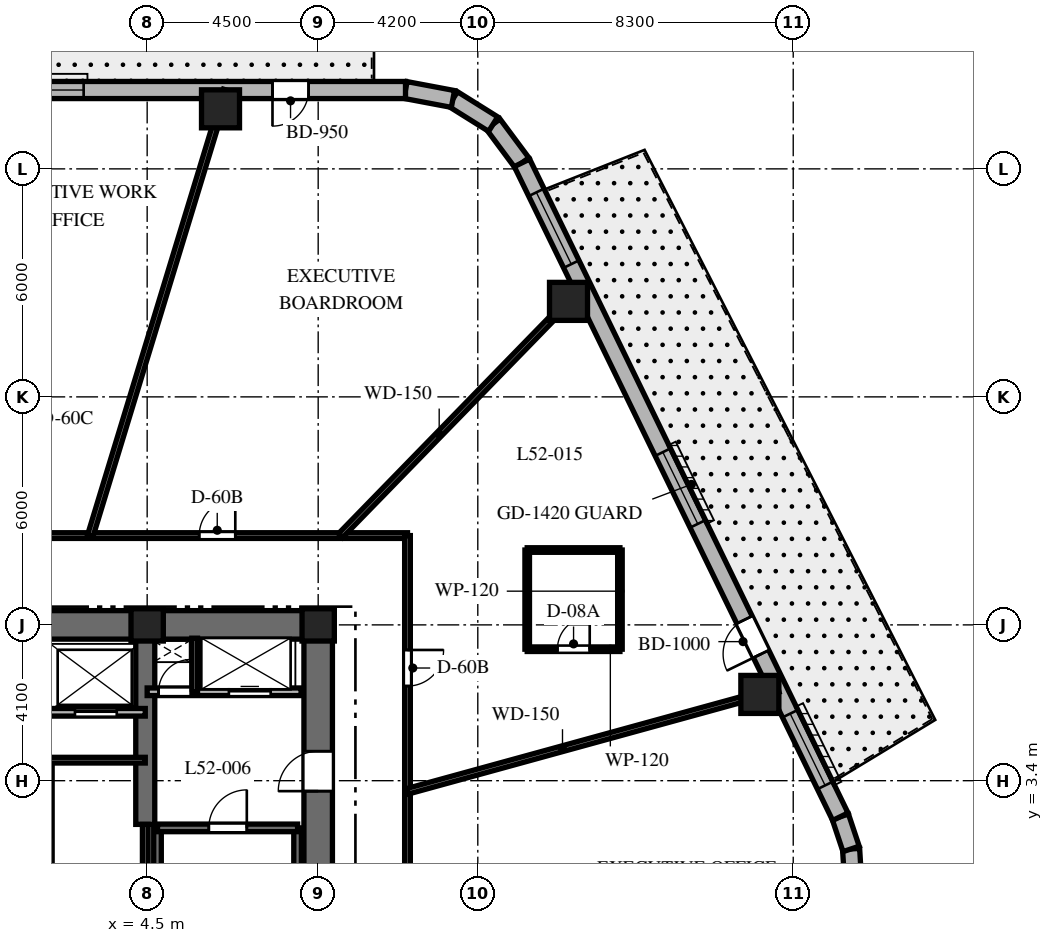
"""IFC4 building model, lengths in metres.
Left out: names, types, materials, properties, quantities, classifications, styles, units other than length and angle.
Written with IfcOpenShell. Run it as: python <this file> out.ifc"""

import sys

from ifc_helpers import new_model, si_unit, direction, frame, frame_2d, origin, origin_2d, place, context, subcontext, project, spatial, rectangle, extrude, element, fill, save


model = new_model("IFC4")
c1 = context("Model", 3, precision=1e-05, world=origin(), true_north=direction((0.0, 1.0)))
c2 = subcontext(c1, "Body", "Model", "MODEL_VIEW")
j1 = project(units=[si_unit("LENGTHUNIT", "METRE"), si_unit("PLANEANGLEUNIT", "RADIAN")], contexts=[c1])
p1 = place(None, origin())
s1 = spatial("IfcSite", under=j1, at=p1, CompositionType="ELEMENT")
p2 = place(p1, origin())
s2 = spatial("IfcBuilding", under=s1, at=p2, CompositionType="ELEMENT")
p3 = place(p2, frame((0.0, 0.0, 210.3)))
s3 = spatial("IfcBuildingStorey", under=s2, at=p3, CompositionType="ELEMENT", Elevation=210.3)
p4 = place(p3, frame((1.85, 7.5, 0.0), z_axis=(0.0, 0.0, 1.0), x_axis=(1.0, 0.0, 0.0)))
e1 = element("IfcWall", 1, at=p4, inside=s3, PredefinedType="SHEAR", context=c2, shape_type="SweptSolid", body=[
    extrude(rectangle(XDim=7.525, YDim=0.75, at=frame_2d((3.762, 0.0))), origin(), (0.0, 0.0, 1.0), 3.8),
])
p5 = place(p3, frame((9.0, -7.125, 0.0), z_axis=(0.0, 0.0, 1.0), x_axis=(0.0, 1.0, 0.0)))
e2 = element("IfcWall", 2, at=p5, inside=s3, PredefinedType="SHEAR", context=c2, shape_type="SweptSolid", body=[
    extrude(rectangle(XDim=14.25, YDim=0.75, at=frame_2d((7.125, 0.0))), origin(), (0.0, 0.0, 1.0), 3.8),
])
p6 = place(p5, frame((10.25, 0.0, 0.0)))
e3 = element("IfcOpeningElement", 3, at=p6, cuts=e2, PredefinedType="OPENING", context=c2, shape_type="SweptSolid", body=[
    extrude(rectangle(XDim=1.05, YDim=2.15, at=frame_2d((0.525, 1.075))), frame((0.0, 0.385, 0.0), z_axis=(0.0, -1.0, 0.0), x_axis=(1.0, 0.0, 0.0)), (0.0, 0.0, 1.0), 0.77),
])
p7 = place(p3, frame((4.45, 2.25, 0.0), z_axis=(0.0, 0.0, 1.0), x_axis=(0.0, 1.0, 0.0)))
e4 = element("IfcWall", 4, at=p7, inside=s3, PredefinedType="SHEAR", context=c2, shape_type="SweptSolid", body=[
    extrude(rectangle(XDim=4.875, YDim=0.5, at=frame_2d((2.438, 0.0))), origin(), (0.0, 0.0, 1.0), 3.8),
])
for number, where, z_axis, x_axis in (
    (5, (4.772, -6.985, 0.0), (0.0, 0.0, 1.0), (0.0, 1.0, 0.0)),
    (6, (8.458, -6.985, 0.0), (0.0, 0.0, 1.0), (0.0, 1.0, 0.0)),
):
    element("IfcWall", number, at=place(p3, frame(where, z_axis=z_axis, x_axis=x_axis)), inside=s3, PredefinedType="SHEAR", context=c2, shape_type="SweptSolid", body=[
        extrude(rectangle(XDim=9.143, YDim=0.2, at=frame_2d((4.572, 0.0))), origin(), (0.0, 0.0, 1.0), 3.8),
    ])
p8 = place(p3, frame((4.772, 2.158, 0.0), z_axis=(0.0, 0.0, 1.0), x_axis=(1.0, 0.0, 0.0)))
e7 = element("IfcWall", 7, at=p8, inside=s3, PredefinedType="SHEAR", context=c2, shape_type="SweptSolid", body=[
    extrude(rectangle(XDim=3.686, YDim=0.2, at=frame_2d((1.843, 0.0))), origin(), (0.0, 0.0, 1.0), 3.8),
])
p9 = place(p8, frame((1.35, 0.0, 0.0)))
e8 = element("IfcOpeningElement", 8, at=p9, cuts=e7, PredefinedType="OPENING", context=c2, shape_type="SweptSolid", body=[
    extrude(rectangle(XDim=1.0, YDim=2.15, at=frame_2d((0.5, 1.075))), frame((0.0, 0.11, 0.0), z_axis=(0.0, -1.0, 0.0), x_axis=(1.0, 0.0, 0.0)), (0.0, 0.0, 1.0), 0.22),
])
for number, where, z_axis, x_axis in (
    (9, (9.0, 7.5, 0.0), (0.0, 0.0, 1.0), (1.0, 0.0, 0.0)),
    (10, (4.5, 7.5, 0.0), (0.0, 0.0, 1.0), (1.0, 0.0, 0.0)),
):
    element("IfcColumn", number, at=place(p3, frame(where, z_axis=z_axis, x_axis=x_axis)), inside=s3, PredefinedType="COLUMN", context=c2, shape_type="SweptSolid", body=[
        extrude(rectangle(XDim=0.85, YDim=0.85, at=origin_2d()), origin(), (0.0, 0.0, 1.0), 3.8),
    ])
for number, where, z_axis, x_axis in (
    (11, (20.622, 5.67, 0.0), (0.0, 0.0, 1.0), (1.0, 0.0, 0.0)),
    (12, (15.587, 16.013, 0.0), (0.0, 0.0, 1.0), (1.0, 0.0, 0.0)),
    (13, (6.43, 21.08, 0.0), (0.0, 0.0, 1.0), (1.0, 0.0, 0.0)),
):
    element("IfcColumn", number, at=place(p3, frame(where, z_axis=z_axis, x_axis=x_axis)), inside=s3, PredefinedType="COLUMN", context=c2, shape_type="SweptSolid", body=[
        extrude(rectangle(XDim=1.0, YDim=1.0, at=origin_2d()), origin(), (0.0, 0.0, 1.0), 3.8),
    ])
p10 = place(p3, frame((23.076, 0.727, 0.0), z_axis=(0.0, 0.0, 1.0), x_axis=(-0.060805222108, 0.998149650586, 0.0)))
e14 = element("IfcWall", 14, at=p10, inside=s3, PredefinedType="SOLIDWALL", context=c2, shape_type="SweptSolid", body=[
    extrude(rectangle(XDim=0.879, YDim=0.45, at=frame_2d((0.44, 0.0))), origin(), (0.0, 0.0, 1.0), 3.5),
])
p11 = place(p3, frame((23.023, 1.604, 0.0), z_axis=(0.0, 0.0, 1.0), x_axis=(-0.316801227695, 0.948491951537, 0.0)))
e15 = element("IfcWall", 15, at=p11, inside=s3, PredefinedType="SOLIDWALL", context=c2, shape_type="SweptSolid", body=[
    extrude(rectangle(XDim=0.894, YDim=0.45, at=frame_2d((0.447, 0.0))), origin(), (0.0, 0.0, 1.0), 3.5),
])
p12 = place(p3, frame((14.362, 19.658, 0.0), z_axis=(0.0, 0.0, 1.0), x_axis=(-0.596642462792, 0.80250717853, 0.0)))
e16 = element("IfcWall", 16, at=p12, inside=s3, PredefinedType="SOLIDWALL", context=c2, shape_type="SweptSolid", body=[
    extrude(rectangle(XDim=1.27, YDim=0.45, at=frame_2d((0.635, 0.0))), origin(), (0.0, 0.0, 1.0), 3.5),
])
p13 = place(p3, frame((13.604, 20.678, 0.0), z_axis=(0.0, 0.0, 1.0), x_axis=(-0.847910404124, 0.53013955387, 0.0)))
e17 = element("IfcWall", 17, at=p13, inside=s3, PredefinedType="SOLIDWALL", context=c2, shape_type="SweptSolid", body=[
    extrude(rectangle(XDim=1.249, YDim=0.45, at=frame_2d((0.624, 0.0))), origin(), (0.0, 0.0, 1.0), 3.5),
])
p14 = place(p3, frame((12.546, 21.34, 0.0), z_axis=(0.0, 0.0, 1.0), x_axis=(-0.982686750835, 0.18527479519, 0.0)))
e18 = element("IfcWall", 18, at=p14, inside=s3, PredefinedType="SOLIDWALL", context=c2, shape_type="SweptSolid", body=[
    extrude(rectangle(XDim=1.27, YDim=0.45, at=frame_2d((0.635, 0.0))), origin(), (0.0, 0.0, 1.0), 3.5),
])
p15 = place(p3, frame((22.74, 2.452, 0.0), z_axis=(0.0, 0.0, 1.0), x_axis=(-0.437753424814, 0.899095066755, 0.0)))
e19 = element("IfcWall", 19, at=p15, inside=s3, PredefinedType="SOLIDWALL", context=c2, shape_type="SweptSolid", body=[
    extrude(rectangle(XDim=19.137, YDim=0.45, at=frame_2d((9.569, 0.0))), origin(), (0.0, 0.0, 1.0), 3.5),
])
p16 = place(p15, frame((4.763, 0.0, 0.0)))
e20 = element("IfcOpeningElement", 20, at=p16, cuts=e19, PredefinedType="OPENING", context=c2, shape_type="SweptSolid", body=[
    extrude(rectangle(XDim=1.0, YDim=2.15, at=frame_2d((0.5, 1.075))), frame((0.0, 0.235, 0.0), z_axis=(0.0, -1.0, 0.0), x_axis=(1.0, 0.0, 0.0)), (0.0, 0.0, 1.0), 0.47),
])
p17 = place(p15, frame((8.57, 0.0, 0.8)))
e21 = element("IfcOpeningElement", 21, at=p17, cuts=e19, PredefinedType="OPENING", context=c2, shape_type="SweptSolid", body=[
    extrude(rectangle(XDim=2.1, YDim=1.85, at=frame_2d((1.05, 0.925))), frame((0.0, 0.235, 0.0), z_axis=(0.0, -1.0, 0.0), x_axis=(1.0, 0.0, 0.0)), (0.0, 0.0, 1.0), 0.47),
])
p18 = place(p15, frame((16.173, 0.0, 0.8)))
e22 = element("IfcOpeningElement", 22, at=p18, cuts=e19, PredefinedType="OPENING", context=c2, shape_type="SweptSolid", body=[
    extrude(rectangle(XDim=2.1, YDim=1.85, at=frame_2d((1.05, 0.925))), frame((0.0, 0.235, 0.0), z_axis=(0.0, -1.0, 0.0), x_axis=(1.0, 0.0, 0.0)), (0.0, 0.0, 1.0), 0.47),
])
p19 = place(p15, frame((0.916, 0.0, 0.8)))
e23 = element("IfcOpeningElement", 23, at=p19, cuts=e19, PredefinedType="OPENING", context=c2, shape_type="SweptSolid", body=[
    extrude(rectangle(XDim=2.1, YDim=1.85, at=frame_2d((1.05, 0.925))), frame((0.0, 0.235, 0.0), z_axis=(0.0, -1.0, 0.0), x_axis=(1.0, 0.0, 0.0)), (0.0, 0.0, 1.0), 0.47),
])
p20 = place(p3, frame((11.298, 21.575, 0.0), z_axis=(0.0, 0.0, 1.0), x_axis=(-1.0, 0.0, 0.0)))
e24 = element("IfcWall", 24, at=p20, inside=s3, PredefinedType="SOLIDWALL", context=c2, shape_type="SweptSolid", body=[
    extrude(rectangle(XDim=24.399, YDim=0.45, at=frame_2d((12.2, 0.0))), origin(), (0.0, 0.0, 1.0), 3.5),
])
p21 = place(p20, frame((2.55, 0.0, 0.0)))
e25 = element("IfcOpeningElement", 25, at=p21, cuts=e24, PredefinedType="OPENING", context=c2, shape_type="SweptSolid", body=[
    extrude(rectangle(XDim=0.95, YDim=2.15, at=frame_2d((0.475, 1.075))), frame((0.0, 0.235, 0.0), z_axis=(0.0, -1.0, 0.0), x_axis=(1.0, 0.0, 0.0)), (0.0, 0.0, 1.0), 0.47),
])
p22 = place(p20, frame((8.469, 0.0, 0.8)))
e26 = element("IfcOpeningElement", 26, at=p22, cuts=e24, PredefinedType="OPENING", context=c2, shape_type="SweptSolid", body=[
    extrude(rectangle(XDim=1.5, YDim=1.8, at=frame_2d((0.75, 0.9))), frame((0.0, 0.235, 0.0), z_axis=(0.0, -1.0, 0.0), x_axis=(1.0, 0.0, 0.0)), (0.0, 0.0, 1.0), 0.47),
])
p23 = place(p20, frame((15.222, 0.0, 0.8)))
e27 = element("IfcOpeningElement", 27, at=p23, cuts=e24, PredefinedType="OPENING", context=c2, shape_type="SweptSolid", body=[
    extrude(rectangle(XDim=1.5, YDim=1.8, at=frame_2d((0.75, 0.9))), frame((0.0, 0.235, 0.0), z_axis=(0.0, -1.0, 0.0), x_axis=(1.0, 0.0, 0.0)), (0.0, 0.0, 1.0), 0.47),
])
p24 = place(p20, frame((21.296, 0.0, 0.8)))
e28 = element("IfcOpeningElement", 28, at=p24, cuts=e24, PredefinedType="OPENING", context=c2, shape_type="SweptSolid", body=[
    extrude(rectangle(XDim=1.5, YDim=1.8, at=frame_2d((0.75, 0.9))), frame((0.0, 0.235, 0.0), z_axis=(0.0, -1.0, 0.0), x_axis=(1.0, 0.0, 0.0)), (0.0, 0.0, 1.0), 0.47),
])
p25 = place(p3, frame((4.5, 5.74, 0.0), z_axis=(0.0, 0.0, 1.0), x_axis=(1.0, 0.0, 0.0)))
e29 = element("IfcWall", 29, at=p25, inside=s3, PredefinedType="PARTITIONING", context=c2, shape_type="SweptSolid", body=[
    extrude(rectangle(XDim=4.05, YDim=0.2, at=frame_2d((2.025, 0.0))), origin(), (0.0, 0.0, 1.0), 3.5),
])
p26 = place(p25, frame((0.3, 0.0, 0.0)))
e30 = element("IfcOpeningElement", 30, at=p26, cuts=e29, PredefinedType="OPENING", context=c2, shape_type="SweptSolid", body=[
    extrude(rectangle(XDim=0.85, YDim=2.03, at=frame_2d((0.425, 1.015))), frame((0.0, 0.11, 0.0), z_axis=(0.0, -1.0, 0.0), x_axis=(1.0, 0.0, 0.0)), (0.0, 0.0, 1.0), 0.22),
])
p27 = place(p25, frame((2.15, 0.0, 0.0)))
e31 = element("IfcOpeningElement", 31, at=p27, cuts=e29, PredefinedType="OPENING", context=c2, shape_type="SweptSolid", body=[
    extrude(rectangle(XDim=1.1, YDim=2.2, at=frame_2d((0.55, 1.1))), frame((0.0, 0.11, 0.0), z_axis=(0.0, -1.0, 0.0), x_axis=(1.0, 0.0, 0.0)), (0.0, 0.0, 1.0), 0.22),
])
p28 = place(p3, frame((5.75, 5.74, 0.0), z_axis=(0.0, 0.0, 1.0), x_axis=(0.0, 1.0, 0.0)))
e32 = element("IfcWall", 32, at=p28, inside=s3, PredefinedType="PARTITIONING", context=c2, shape_type="SweptSolid", body=[
    extrude(rectangle(XDim=1.41, YDim=0.15, at=frame_2d((0.705, 0.0))), origin(), (0.0, 0.0, 1.0), 3.5),
])
p29 = place(p3, frame((1.85, 5.2, 0.0), z_axis=(0.0, 0.0, 1.0), x_axis=(1.0, 0.0, 0.0)))
e33 = element("IfcWall", 33, at=p29, inside=s3, PredefinedType="PARTITIONING", context=c2, shape_type="SweptSolid", body=[
    extrude(rectangle(XDim=2.6, YDim=0.2, at=frame_2d((1.3, 0.0))), origin(), (0.0, 0.0, 1.0), 3.5),
])
p30 = place(p29, frame((0.75, 0.0, 0.0)))
e34 = element("IfcOpeningElement", 34, at=p30, cuts=e33, PredefinedType="OPENING", context=c2, shape_type="SweptSolid", body=[
    extrude(rectangle(XDim=1.1, YDim=2.2, at=frame_2d((0.55, 1.1))), frame((0.0, 0.11, 0.0), z_axis=(0.0, -1.0, 0.0), x_axis=(1.0, 0.0, 0.0)), (0.0, 0.0, 1.0), 0.22),
])
p31 = place(p3, frame((4.45, -1.972, 0.0), z_axis=(0.0, 0.0, 1.0), x_axis=(0.0, 1.0, 0.0)))
e35 = element("IfcWall", 35, at=p31, inside=s3, PredefinedType="PARTITIONING", context=c2, shape_type="SweptSolid", body=[
    extrude(rectangle(XDim=4.222, YDim=0.15, at=frame_2d((2.111, 0.0))), origin(), (0.0, 0.0, 1.0), 3.5),
])
p32 = place(p3, frame((1.9, 3.94, 0.0), z_axis=(0.0, 0.0, 1.0), x_axis=(1.0, 0.0, 0.0)))
e36 = element("IfcWall", 36, at=p32, inside=s3, PredefinedType="PARTITIONING", context=c2, shape_type="SweptSolid", body=[
    extrude(rectangle(XDim=2.55, YDim=0.15, at=frame_2d((1.275, 0.0))), origin(), (0.0, 0.0, 1.0), 3.5),
])
p33 = place(p3, frame((0.92, 9.85, 0.0), z_axis=(0.0, 0.0, 1.0), x_axis=(1.0, 0.0, 0.0)))
e37 = element("IfcWall", 37, at=p33, inside=s3, PredefinedType="PARTITIONING", context=c2, shape_type="SweptSolid", body=[
    extrude(rectangle(XDim=10.43, YDim=0.15, at=frame_2d((5.215, 0.0))), origin(), (0.0, 0.0, 1.0), 2.99),
])
p34 = place(p33, frame((4.949, 0.0, 0.0)))
e38 = element("IfcOpeningElement", 38, at=p34, cuts=e37, PredefinedType="OPENING", context=c2, shape_type="SweptSolid", body=[
    extrude(rectangle(XDim=0.95, YDim=2.03, at=frame_2d((0.475, 1.015))), frame((0.0, 0.085, 0.0), z_axis=(0.0, -1.0, 0.0), x_axis=(1.0, 0.0, 0.0)), (0.0, 0.0, 1.0), 0.17),
])
p35 = place(p3, frame((11.35, 9.85, 0.0), z_axis=(0.0, 0.0, 1.0), x_axis=(0.0, -1.0, 0.0)))
e39 = element("IfcWall", 39, at=p35, inside=s3, PredefinedType="PARTITIONING", context=c2, shape_type="SweptSolid", body=[
    extrude(rectangle(XDim=12.4, YDim=0.15, at=frame_2d((6.2, 0.0))), origin(), (0.0, 0.0, 1.0), 2.99),
])
p36 = place(p35, frame((3.01, 0.0, 0.0)))
e40 = element("IfcOpeningElement", 40, at=p36, cuts=e39, PredefinedType="OPENING", context=c2, shape_type="SweptSolid", body=[
    extrude(rectangle(XDim=0.95, YDim=2.03, at=frame_2d((0.475, 1.015))), frame((0.0, 0.085, 0.0), z_axis=(0.0, -1.0, 0.0), x_axis=(1.0, 0.0, 0.0)), (0.0, 0.0, 1.0), 0.17),
])
p37 = place(p35, frame((8.835, 0.0, 0.0)))
e41 = element("IfcOpeningElement", 41, at=p37, cuts=e39, PredefinedType="OPENING", context=c2, shape_type="SweptSolid", body=[
    extrude(rectangle(XDim=0.95, YDim=2.03, at=frame_2d((0.475, 1.015))), frame((0.0, 0.085, 0.0), z_axis=(0.0, -1.0, 0.0), x_axis=(1.0, 0.0, 0.0)), (0.0, 0.0, 1.0), 0.17),
])
p38 = place(p3, frame((11.35, 3.121, 0.0), z_axis=(0.0, 0.0, 1.0), x_axis=(0.964212793822, 0.265129568758, 0.0)))
e42 = element("IfcWall", 42, at=p38, inside=s3, PredefinedType="PARTITIONING", context=c2, shape_type="SweptSolid", body=[
    extrude(rectangle(XDim=10.12, YDim=0.15, at=frame_2d((5.06, 0.0))), origin(), (0.0, 0.0, 1.0), 2.74),
])
p39 = place(p3, frame((9.588, 9.85, 0.0), z_axis=(0.0, 0.0, 1.0), x_axis=(0.697519469595, 0.716565830567, 0.0)))
e43 = element("IfcWall", 43, at=p39, inside=s3, PredefinedType="PARTITIONING", context=c2, shape_type="SweptSolid", body=[
    extrude(rectangle(XDim=9.126, YDim=0.15, at=frame_2d((4.563, 0.0))), origin(), (0.0, 0.0, 1.0), 2.74),
])
p40 = place(p3, frame((3.004, 9.85, 0.0), z_axis=(0.0, 0.0, 1.0), x_axis=(0.291775760688, 0.956486751333, 0.0)))
e44 = element("IfcWall", 44, at=p40, inside=s3, PredefinedType="PARTITIONING", context=c2, shape_type="SweptSolid", body=[
    extrude(rectangle(XDim=12.258, YDim=0.15, at=frame_2d((6.129, 0.0))), origin(), (0.0, 0.0, 1.0), 2.74),
])
p41 = place(p3, frame((14.5, 6.86, 0.0), z_axis=(0.0, 0.0, 1.0), x_axis=(1.0, 0.0, 0.0)))
e45 = element("IfcWall", 45, at=p41, inside=s3, PredefinedType="PARTITIONING", context=c2, shape_type="SweptSolid", body=[
    extrude(rectangle(XDim=2.44, YDim=0.12, at=frame_2d((1.22, 0.0))), origin(), (0.0, 0.0, 1.0), 3.026),
])
p42 = place(p41, frame((0.795, 0.0, 0.0)))
e46 = element("IfcOpeningElement", 46, at=p42, cuts=e45, PredefinedType="OPENING", context=c2, shape_type="SweptSolid", body=[
    extrude(rectangle(XDim=0.85, YDim=2.03, at=frame_2d((0.425, 1.015))), frame((0.0, 0.07, 0.0), z_axis=(0.0, -1.0, 0.0), x_axis=(1.0, 0.0, 0.0)), (0.0, 0.0, 1.0), 0.14),
])
p43 = place(p3, frame((16.94, 6.86, 0.0), z_axis=(0.0, 0.0, 1.0), x_axis=(0.0, 1.0, 0.0)))
e47 = element("IfcWall", 47, at=p43, inside=s3, PredefinedType="PARTITIONING", context=c2, shape_type="SweptSolid", body=[
    extrude(rectangle(XDim=2.61, YDim=0.12, at=frame_2d((1.305, 0.0))), origin(), (0.0, 0.0, 1.0), 3.5),
])
p44 = place(p3, frame((16.94, 9.47, 0.0), z_axis=(0.0, 0.0, 1.0), x_axis=(-1.0, 0.0, 0.0)))
e48 = element("IfcWall", 48, at=p44, inside=s3, PredefinedType="PARTITIONING", context=c2, shape_type="SweptSolid", body=[
    extrude(rectangle(XDim=2.44, YDim=0.12, at=frame_2d((1.22, 0.0))), origin(), (0.0, 0.0, 1.0), 3.026),
])
p45 = place(p3, frame((14.5, 9.47, 0.0), z_axis=(0.0, 0.0, 1.0), x_axis=(0.0, -1.0, 0.0)))
e49 = element("IfcWall", 49, at=p45, inside=s3, PredefinedType="PARTITIONING", context=c2, shape_type="SweptSolid", body=[
    extrude(rectangle(XDim=2.61, YDim=0.12, at=frame_2d((1.305, 0.0))), origin(), (0.0, 0.0, 1.0), 3.5),
])
p46 = place(p16, origin())
e50 = element("IfcDoor", 50, at=p46, inside=s3, OperationType="SINGLE_SWING_LEFT", PredefinedType="DOOR", context=c2, shape_type="SweptSolid", body=[
    extrude(rectangle(XDim=1.0, YDim=2.15, at=frame_2d((0.5, 1.075))), frame((0.0, 0.025, 0.0), z_axis=(0.0, -1.0, 0.0), x_axis=(1.0, 0.0, 0.0)), (0.0, 0.0, 1.0), 0.05),
])
fill(e20, e50)
p47 = place(p17, origin())
e51 = element("IfcWindow", 51, at=p47, inside=s3, PartitioningType="SINGLE_PANEL", PredefinedType="WINDOW", context=c2, shape_type="SweptSolid", body=[
    extrude(rectangle(XDim=2.1, YDim=1.85, at=frame_2d((1.05, 0.925))), frame((0.0, 0.03, 0.0), z_axis=(0.0, -1.0, 0.0), x_axis=(1.0, 0.0, 0.0)), (0.0, 0.0, 1.0), 0.06),
])
fill(e21, e51)
p48 = place(p18, origin())
e52 = element("IfcWindow", 52, at=p48, inside=s3, PartitioningType="SINGLE_PANEL", PredefinedType="WINDOW", context=c2, shape_type="SweptSolid", body=[
    extrude(rectangle(XDim=2.1, YDim=1.85, at=frame_2d((1.05, 0.925))), frame((0.0, 0.03, 0.0), z_axis=(0.0, -1.0, 0.0), x_axis=(1.0, 0.0, 0.0)), (0.0, 0.0, 1.0), 0.06),
])
fill(e22, e52)
p49 = place(p19, origin())
e53 = element("IfcWindow", 53, at=p49, inside=s3, PartitioningType="SINGLE_PANEL", PredefinedType="WINDOW", context=c2, shape_type="SweptSolid", body=[
    extrude(rectangle(XDim=2.1, YDim=1.85, at=frame_2d((1.05, 0.925))), frame((0.0, 0.03, 0.0), z_axis=(0.0, -1.0, 0.0), x_axis=(1.0, 0.0, 0.0)), (0.0, 0.0, 1.0), 0.06),
])
fill(e23, e53)
p50 = place(p21, origin())
e54 = element("IfcDoor", 54, at=p50, inside=s3, OperationType="SINGLE_SWING_RIGHT", PredefinedType="DOOR", context=c2, shape_type="SweptSolid", body=[
    extrude(rectangle(XDim=0.95, YDim=2.15, at=frame_2d((0.475, 1.075))), frame((0.0, 0.025, 0.0), z_axis=(0.0, -1.0, 0.0), x_axis=(1.0, 0.0, 0.0)), (0.0, 0.0, 1.0), 0.05),
])
fill(e25, e54)
p51 = place(p22, origin())
e55 = element("IfcWindow", 55, at=p51, inside=s3, PartitioningType="SINGLE_PANEL", PredefinedType="WINDOW", context=c2, shape_type="SweptSolid", body=[
    extrude(rectangle(XDim=1.5, YDim=1.8, at=frame_2d((0.75, 0.9))), frame((0.0, 0.03, 0.0), z_axis=(0.0, -1.0, 0.0), x_axis=(1.0, 0.0, 0.0)), (0.0, 0.0, 1.0), 0.06),
])
fill(e26, e55)
p52 = place(p9, origin())
e56 = element("IfcDoor", 56, at=p52, inside=s3, OperationType="SINGLE_SWING_RIGHT", PredefinedType="DOOR", context=c2, shape_type="SweptSolid", body=[
    extrude(rectangle(XDim=1.0, YDim=2.15, at=frame_2d((0.5, 1.075))), frame((0.0, 0.025, 0.0), z_axis=(0.0, -1.0, 0.0), x_axis=(1.0, 0.0, 0.0)), (0.0, 0.0, 1.0), 0.05),
])
fill(e8, e56)
p53 = place(p6, origin())
e57 = element("IfcDoor", 57, at=p53, inside=s3, OperationType="SINGLE_SWING_LEFT", PredefinedType="DOOR", context=c2, shape_type="SweptSolid", body=[
    extrude(rectangle(XDim=1.05, YDim=2.15, at=frame_2d((0.525, 1.075))), frame((0.0, 0.025, 0.0), z_axis=(0.0, -1.0, 0.0), x_axis=(1.0, 0.0, 0.0)), (0.0, 0.0, 1.0), 0.05),
])
fill(e3, e57)
p54 = place(p26, origin())
e58 = element("IfcDoor", 58, at=p54, inside=s3, OperationType="SINGLE_SWING_RIGHT", PredefinedType="DOOR", context=c2, shape_type="SweptSolid", body=[
    extrude(rectangle(XDim=0.85, YDim=2.03, at=frame_2d((0.425, 1.015))), frame((0.0, 0.025, 0.0), z_axis=(0.0, -1.0, 0.0), x_axis=(1.0, 0.0, 0.0)), (0.0, 0.0, 1.0), 0.05),
])
fill(e30, e58)
p55 = place(p27, origin())
e59 = element("IfcDoor", 59, at=p55, inside=s3, OperationType="SLIDING_TO_RIGHT", PredefinedType="DOOR", context=c2, shape_type="SweptSolid", body=[
    extrude(rectangle(XDim=1.1, YDim=2.2, at=frame_2d((0.55, 1.1))), frame((0.0, 0.025, 0.0), z_axis=(0.0, -1.0, 0.0), x_axis=(1.0, 0.0, 0.0)), (0.0, 0.0, 1.0), 0.05),
])
fill(e31, e59)
p56 = place(p30, origin())
e60 = element("IfcDoor", 60, at=p56, inside=s3, OperationType="SLIDING_TO_RIGHT", PredefinedType="DOOR", context=c2, shape_type="SweptSolid", body=[
    extrude(rectangle(XDim=1.1, YDim=2.2, at=frame_2d((0.55, 1.1))), frame((0.0, 0.025, 0.0), z_axis=(0.0, -1.0, 0.0), x_axis=(1.0, 0.0, 0.0)), (0.0, 0.0, 1.0), 0.05),
])
fill(e34, e60)
p57 = place(p36, origin())
e61 = element("IfcDoor", 61, at=p57, inside=s3, OperationType="SINGLE_SWING_LEFT", PredefinedType="DOOR", context=c2, shape_type="SweptSolid", body=[
    extrude(rectangle(XDim=0.95, YDim=2.03, at=frame_2d((0.475, 1.015))), frame((0.0, 0.025, 0.0), z_axis=(0.0, -1.0, 0.0), x_axis=(1.0, 0.0, 0.0)), (0.0, 0.0, 1.0), 0.05),
])
fill(e40, e61)
p58 = place(p42, origin())
e62 = element("IfcDoor", 62, at=p58, inside=s3, OperationType="SINGLE_SWING_RIGHT", PredefinedType="DOOR", context=c2, shape_type="SweptSolid", body=[
    extrude(rectangle(XDim=0.85, YDim=2.03, at=frame_2d((0.425, 1.015))), frame((0.0, 0.025, 0.0), z_axis=(0.0, -1.0, 0.0), x_axis=(1.0, 0.0, 0.0)), (0.0, 0.0, 1.0), 0.05),
])
fill(e46, e62)
p59 = place(p34, origin())
e63 = element("IfcDoor", 63, at=p59, inside=s3, OperationType="SINGLE_SWING_RIGHT", PredefinedType="DOOR", context=c2, shape_type="SweptSolid", body=[
    extrude(rectangle(XDim=0.95, YDim=2.03, at=frame_2d((0.475, 1.015))), frame((0.0, 0.025, 0.0), z_axis=(0.0, -1.0, 0.0), x_axis=(1.0, 0.0, 0.0)), (0.0, 0.0, 1.0), 0.05),
])
fill(e38, e63)
save(model, sys.argv[1])
